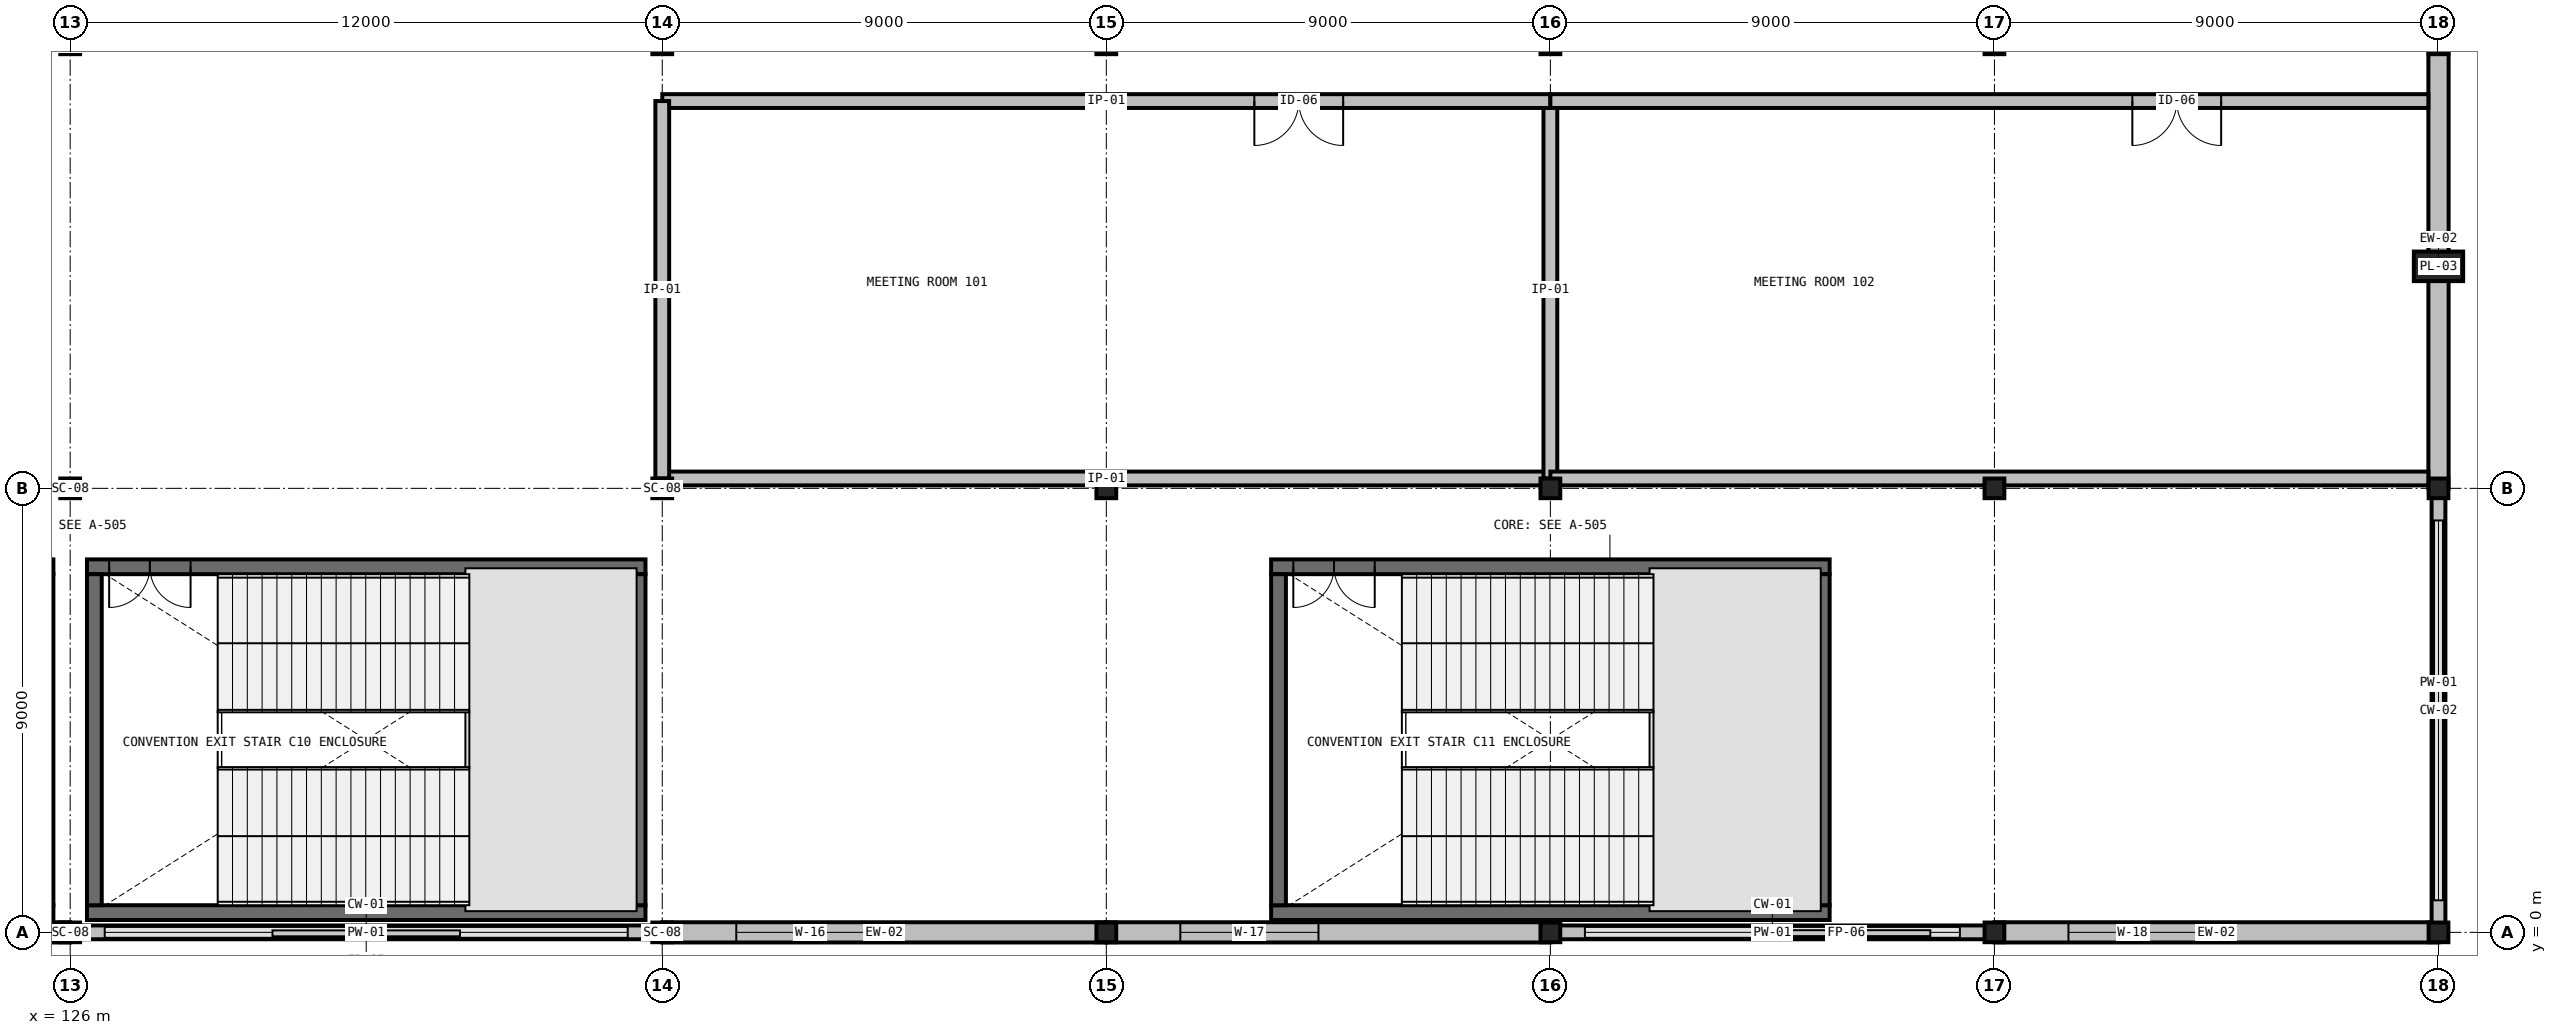
"""IFC4 building model, lengths in metres.
Left out: names, types, materials, properties, quantities, classifications, styles, units other than length and angle.
Written with IfcOpenShell. Run it as: python <this file> out.ifc"""

import sys

from ifc_helpers import new_model, si_unit, direction, frame, frame_2d, origin, origin_2d, place, context, subcontext, project, spatial, rectangle, i_section, extrude, element, fill, save


model = new_model("IFC4")
c1 = context("Model", 3, precision=1e-05, world=origin(), true_north=direction((0.0, 1.0)))
c2 = subcontext(c1, "Body", "Model", "MODEL_VIEW")
j1 = project(units=[si_unit("LENGTHUNIT", "METRE"), si_unit("PLANEANGLEUNIT", "RADIAN")], contexts=[c1])
p1 = place(None, origin())
s1 = spatial("IfcSite", under=j1, at=p1, CompositionType="ELEMENT")
p2 = place(p1, origin())
s2 = spatial("IfcBuilding", under=s1, at=p2, CompositionType="ELEMENT")
p3 = place(p2, frame((0.0, 0.0, 6.0)))
s3 = spatial("IfcBuildingStorey", under=s2, at=p3, CompositionType="ELEMENT", Elevation=6.0)
for number, where, z_axis, x_axis in (
    (1, (126.0, 0.0, 0.0), (0.0, 0.0, 1.0), (1.0, 0.0, 0.0)),
    (2, (126.0, 9.0, 0.0), (0.0, 0.0, 1.0), (1.0, 0.0, 0.0)),
    (3, (126.0, 18.0, 0.0), (0.0, 0.0, 1.0), (1.0, 0.0, 0.0)),
    (4, (138.0, 0.0, 0.0), (0.0, 0.0, 1.0), (1.0, 0.0, 0.0)),
    (5, (138.0, 9.0, 0.0), (0.0, 0.0, 1.0), (1.0, 0.0, 0.0)),
    (6, (138.0, 18.0, 0.0), (0.0, 0.0, 1.0), (1.0, 0.0, 0.0)),
    (7, (147.0, 0.0, 0.0), (0.0, 0.0, 1.0), (1.0, 0.0, 0.0)),
    (8, (147.0, 9.0, 0.0), (0.0, 0.0, 1.0), (1.0, 0.0, 0.0)),
    (9, (147.0, 18.0, 0.0), (0.0, 0.0, 1.0), (1.0, 0.0, 0.0)),
    (10, (156.0, 0.0, 0.0), (0.0, 0.0, 1.0), (1.0, 0.0, 0.0)),
    (11, (156.0, 9.0, 0.0), (0.0, 0.0, 1.0), (1.0, 0.0, 0.0)),
    (12, (156.0, 18.0, 0.0), (0.0, 0.0, 1.0), (1.0, 0.0, 0.0)),
    (13, (165.0, 0.0, 0.0), (0.0, 0.0, 1.0), (1.0, 0.0, 0.0)),
    (14, (165.0, 9.0, 0.0), (0.0, 0.0, 1.0), (1.0, 0.0, 0.0)),
    (15, (165.0, 18.0, 0.0), (0.0, 0.0, 1.0), (1.0, 0.0, 0.0)),
    (16, (174.0, 0.0, 0.0), (0.0, 0.0, 1.0), (1.0, 0.0, 0.0)),
    (17, (174.0, 9.0, 0.0), (0.0, 0.0, 1.0), (1.0, 0.0, 0.0)),
    (18, (174.0, 18.0, 0.0), (0.0, 0.0, 1.0), (1.0, 0.0, 0.0)),
):
    element("IfcColumn", number, at=place(p3, frame(where, z_axis=z_axis, x_axis=x_axis)), inside=s3, PredefinedType="COLUMN", context=c2, shape_type="SweptSolid", body=[
        extrude(i_section(OverallWidth=0.401, OverallDepth=0.399, WebThickness=0.025, FlangeThickness=0.04, FilletRadius=0.031, at=origin_2d()), origin(), (0.0, 0.0, 1.0), 6.0),
    ])
p4 = place(p3, frame((174.0, 13.5, 0.0), z_axis=(0.0, 0.0, 1.0), x_axis=(0.0, 1.0, 0.0)))
e19 = element("IfcColumn", 19, at=p4, inside=s3, PredefinedType="PILASTER", context=c2, shape_type="SweptSolid", body=[
    extrude(rectangle(XDim=0.6, YDim=1.0, at=origin_2d()), origin(), (0.0, 0.0, 1.0), 6.0),
])
p5 = place(p3, frame((125.66, 0.4, 0.0), z_axis=(0.0, 0.0, 1.0), x_axis=(-1.0, 0.0, 0.0)))
e20 = element("IfcWall", 20, at=p5, inside=s3, PredefinedType="SHEAR", context=c2, shape_type="SweptSolid", body=[
    extrude(rectangle(XDim=11.32, YDim=0.3, at=frame_2d((5.66, 0.0))), origin(), (0.0, 0.0, 1.0), 6.0),
])
p6 = place(p3, frame((125.66, 7.41, 0.0), z_axis=(0.0, 0.0, 1.0), x_axis=(-1.0, 0.0, 0.0)))
e21 = element("IfcWall", 21, at=p6, inside=s3, PredefinedType="SHEAR", context=c2, shape_type="SweptSolid", body=[
    extrude(rectangle(XDim=11.32, YDim=0.3, at=frame_2d((5.66, 0.0))), origin(), (0.0, 0.0, 1.0), 6.0),
])
p7 = place(p6, frame((9.22, 0.0, 0.0)))
e22 = element("IfcOpeningElement", 22, at=p7, cuts=e21, PredefinedType="OPENING", context=c2, shape_type="SweptSolid", body=[
    extrude(rectangle(XDim=1.65, YDim=2.25, at=frame_2d((0.825, 1.125))), frame((0.0, 0.165, 0.0), z_axis=(0.0, -1.0, 0.0), x_axis=(1.0, 0.0, 0.0)), (0.0, 0.0, 1.0), 0.33),
])
p8 = place(p3, frame((125.51, 0.55, 0.0), z_axis=(0.0, 0.0, 1.0), x_axis=(0.0, 1.0, 0.0)))
e23 = element("IfcWall", 23, at=p8, inside=s3, PredefinedType="SHEAR", context=c2, shape_type="SweptSolid", body=[
    extrude(rectangle(XDim=6.71, YDim=0.3, at=frame_2d((3.355, 0.0))), origin(), (0.0, 0.0, 1.0), 6.0),
])
p9 = place(p3, frame((137.66, 0.4, 0.0), z_axis=(0.0, 0.0, 1.0), x_axis=(-1.0, 0.0, 0.0)))
e24 = element("IfcWall", 24, at=p9, inside=s3, PredefinedType="SHEAR", context=c2, shape_type="SweptSolid", body=[
    extrude(rectangle(XDim=11.32, YDim=0.3, at=frame_2d((5.66, 0.0))), origin(), (0.0, 0.0, 1.0), 6.0),
])
p10 = place(p3, frame((137.66, 7.41, 0.0), z_axis=(0.0, 0.0, 1.0), x_axis=(-1.0, 0.0, 0.0)))
e25 = element("IfcWall", 25, at=p10, inside=s3, PredefinedType="SHEAR", context=c2, shape_type="SweptSolid", body=[
    extrude(rectangle(XDim=11.32, YDim=0.3, at=frame_2d((5.66, 0.0))), origin(), (0.0, 0.0, 1.0), 6.0),
])
p11 = place(p10, frame((9.22, 0.0, 0.0)))
e26 = element("IfcOpeningElement", 26, at=p11, cuts=e25, PredefinedType="OPENING", context=c2, shape_type="SweptSolid", body=[
    extrude(rectangle(XDim=1.65, YDim=2.25, at=frame_2d((0.825, 1.125))), frame((0.0, 0.165, 0.0), z_axis=(0.0, -1.0, 0.0), x_axis=(1.0, 0.0, 0.0)), (0.0, 0.0, 1.0), 0.33),
])
for number, where, z_axis, x_axis in (
    (27, (126.49, 7.26, 0.0), (0.0, 0.0, 1.0), (0.0, -1.0, 0.0)),
    (28, (137.51, 0.55, 0.0), (0.0, 0.0, 1.0), (0.0, 1.0, 0.0)),
):
    element("IfcWall", number, at=place(p3, frame(where, z_axis=z_axis, x_axis=x_axis)), inside=s3, PredefinedType="SHEAR", context=c2, shape_type="SweptSolid", body=[
        extrude(rectangle(XDim=6.71, YDim=0.3, at=frame_2d((3.355, 0.0))), origin(), (0.0, 0.0, 1.0), 6.0),
    ])
p12 = place(p3, frame((161.66, 0.4, 0.0), z_axis=(0.0, 0.0, 1.0), x_axis=(-1.0, 0.0, 0.0)))
e29 = element("IfcWall", 29, at=p12, inside=s3, PredefinedType="SHEAR", context=c2, shape_type="SweptSolid", body=[
    extrude(rectangle(XDim=11.32, YDim=0.3, at=frame_2d((5.66, 0.0))), origin(), (0.0, 0.0, 1.0), 6.0),
])
p13 = place(p3, frame((161.66, 7.41, 0.0), z_axis=(0.0, 0.0, 1.0), x_axis=(-1.0, 0.0, 0.0)))
e30 = element("IfcWall", 30, at=p13, inside=s3, PredefinedType="SHEAR", context=c2, shape_type="SweptSolid", body=[
    extrude(rectangle(XDim=11.32, YDim=0.3, at=frame_2d((5.66, 0.0))), origin(), (0.0, 0.0, 1.0), 6.0),
])
p14 = place(p13, frame((9.22, 0.0, 0.0)))
e31 = element("IfcOpeningElement", 31, at=p14, cuts=e30, PredefinedType="OPENING", context=c2, shape_type="SweptSolid", body=[
    extrude(rectangle(XDim=1.65, YDim=2.25, at=frame_2d((0.825, 1.125))), frame((0.0, 0.165, 0.0), z_axis=(0.0, -1.0, 0.0), x_axis=(1.0, 0.0, 0.0)), (0.0, 0.0, 1.0), 0.33),
])
for number, where, z_axis, x_axis in (
    (32, (150.49, 7.26, 0.0), (0.0, 0.0, 1.0), (0.0, -1.0, 0.0)),
    (33, (161.51, 0.55, 0.0), (0.0, 0.0, 1.0), (0.0, 1.0, 0.0)),
):
    element("IfcWall", number, at=place(p3, frame(where, z_axis=z_axis, x_axis=x_axis)), inside=s3, PredefinedType="SHEAR", context=c2, shape_type="SweptSolid", body=[
        extrude(rectangle(XDim=6.71, YDim=0.3, at=frame_2d((3.355, 0.0))), origin(), (0.0, 0.0, 1.0), 6.0),
    ])
p15 = place(p3, frame((114.0, 0.0, 0.0), z_axis=(0.0, 0.0, 1.0), x_axis=(1.0, 0.0, 0.0)))
e34 = element("IfcWall", 34, at=p15, inside=s3, PredefinedType="STANDARD", context=c2, shape_type="SweptSolid", body=[
    extrude(rectangle(XDim=12.0, YDim=0.41, at=frame_2d((6.0, 0.0))), origin(), (0.0, 0.0, 1.0), 4.676),
])
p16 = place(p15, frame((1.5, 0.0, 0.85)))
e35 = element("IfcOpeningElement", 35, at=p16, cuts=e34, PredefinedType="OPENING", context=c2, shape_type="SweptSolid", body=[
    extrude(rectangle(XDim=2.2, YDim=1.95, at=frame_2d((1.1, 0.975))), frame((0.0, 0.22, 0.0), z_axis=(0.0, -1.0, 0.0), x_axis=(1.0, 0.0, 0.0)), (0.0, 0.0, 1.0), 0.44),
])
p17 = place(p3, frame((126.0, 0.0, 0.0), z_axis=(0.0, 0.0, 1.0), x_axis=(1.0, 0.0, 0.0)))
e36 = element("IfcWall", 36, at=p17, inside=s3, PredefinedType="PARAPET", context=c2, shape_type="SweptSolid", body=[
    extrude(rectangle(XDim=12.0, YDim=0.28, at=frame_2d((6.0, 0.0))), origin(), (0.0, 0.0, 1.0), 0.2),
])
p18 = place(p3, frame((138.0, 0.0, 0.0), z_axis=(0.0, 0.0, 1.0), x_axis=(1.0, 0.0, 0.0)))
e37 = element("IfcWall", 37, at=p18, inside=s3, PredefinedType="STANDARD", context=c2, shape_type="SweptSolid", body=[
    extrude(rectangle(XDim=9.0, YDim=0.41, at=frame_2d((4.5, 0.0))), origin(), (0.0, 0.0, 1.0), 4.676),
])
p19 = place(p18, frame((1.5, 0.0, 0.85)))
e38 = element("IfcOpeningElement", 38, at=p19, cuts=e37, PredefinedType="OPENING", context=c2, shape_type="SweptSolid", body=[
    extrude(rectangle(XDim=3.0, YDim=2.3, at=frame_2d((1.5, 1.15))), frame((0.0, 0.22, 0.0), z_axis=(0.0, -1.0, 0.0), x_axis=(1.0, 0.0, 0.0)), (0.0, 0.0, 1.0), 0.44),
])
p20 = place(p3, frame((147.0, 0.0, 0.0), z_axis=(0.0, 0.0, 1.0), x_axis=(1.0, 0.0, 0.0)))
e39 = element("IfcWall", 39, at=p20, inside=s3, PredefinedType="STANDARD", context=c2, shape_type="SweptSolid", body=[
    extrude(rectangle(XDim=9.0, YDim=0.41, at=frame_2d((4.5, 0.0))), origin(), (0.0, 0.0, 1.0), 4.676),
])
p21 = place(p20, frame((1.5, 0.0, 0.85)))
e40 = element("IfcOpeningElement", 40, at=p21, cuts=e39, PredefinedType="OPENING", context=c2, shape_type="SweptSolid", body=[
    extrude(rectangle(XDim=2.8, YDim=2.4, at=frame_2d((1.4, 1.2))), frame((0.0, 0.22, 0.0), z_axis=(0.0, -1.0, 0.0), x_axis=(1.0, 0.0, 0.0)), (0.0, 0.0, 1.0), 0.44),
])
p22 = place(p3, frame((156.0, 0.0, 0.0), z_axis=(0.0, 0.0, 1.0), x_axis=(1.0, 0.0, 0.0)))
e41 = element("IfcWall", 41, at=p22, inside=s3, PredefinedType="PARAPET", context=c2, shape_type="SweptSolid", body=[
    extrude(rectangle(XDim=9.0, YDim=0.28, at=frame_2d((4.5, 0.0))), origin(), (0.0, 0.0, 1.0), 0.2),
])
p23 = place(p3, frame((165.0, 0.0, 0.0), z_axis=(0.0, 0.0, 1.0), x_axis=(1.0, 0.0, 0.0)))
e42 = element("IfcWall", 42, at=p23, inside=s3, PredefinedType="STANDARD", context=c2, shape_type="SweptSolid", body=[
    extrude(rectangle(XDim=9.0, YDim=0.41, at=frame_2d((4.5, 0.0))), origin(), (0.0, 0.0, 1.0), 4.676),
])
p24 = place(p23, frame((1.5, 0.0, 0.85)))
e43 = element("IfcOpeningElement", 43, at=p24, cuts=e42, PredefinedType="OPENING", context=c2, shape_type="SweptSolid", body=[
    extrude(rectangle(XDim=2.6, YDim=2.25, at=frame_2d((1.3, 1.125))), frame((0.0, 0.22, 0.0), z_axis=(0.0, -1.0, 0.0), x_axis=(1.0, 0.0, 0.0)), (0.0, 0.0, 1.0), 0.44),
])
p25 = place(p3, frame((174.0, 0.0, 0.0), z_axis=(0.0, 0.0, 1.0), x_axis=(0.0, 1.0, 0.0)))
e44 = element("IfcWall", 44, at=p25, inside=s3, PredefinedType="PARAPET", context=c2, shape_type="SweptSolid", body=[
    extrude(rectangle(XDim=9.0, YDim=0.28, at=frame_2d((4.5, 0.0))), origin(), (0.0, 0.0, 1.0), 0.2),
])
p26 = place(p3, frame((174.0, 9.0, 0.0), z_axis=(0.0, 0.0, 1.0), x_axis=(0.0, 1.0, 0.0)))
e45 = element("IfcWall", 45, at=p26, inside=s3, PredefinedType="STANDARD", context=c2, shape_type="SweptSolid", body=[
    extrude(rectangle(XDim=9.0, YDim=0.41, at=frame_2d((4.5, 0.0))), origin(), (0.0, 0.0, 1.0), 5.269),
])
p27 = place(p3, frame((138.0, 9.2, 0.0), z_axis=(0.0, 0.0, 1.0), x_axis=(1.0, 0.0, 0.0)))
e46 = element("IfcWall", 46, at=p27, inside=s3, PredefinedType="PARTITIONING", context=c2, shape_type="SweptSolid", body=[
    extrude(rectangle(XDim=18.0, YDim=0.28, at=frame_2d((9.0, 0.0))), origin(), (0.0, 0.0, 1.0), 5.68),
])
p28 = place(p3, frame((156.0, 9.2, 0.0), z_axis=(0.0, 0.0, 1.0), x_axis=(0.0, 1.0, 0.0)))
e47 = element("IfcWall", 47, at=p28, inside=s3, PredefinedType="PARTITIONING", context=c2, shape_type="SweptSolid", body=[
    extrude(rectangle(XDim=7.65, YDim=0.28, at=frame_2d((3.825, 0.0))), origin(), (0.0, 0.0, 1.0), 4.913),
])
p29 = place(p3, frame((156.0, 16.85, 0.0), z_axis=(0.0, 0.0, 1.0), x_axis=(-1.0, 0.0, 0.0)))
e48 = element("IfcWall", 48, at=p29, inside=s3, PredefinedType="PARTITIONING", context=c2, shape_type="SweptSolid", body=[
    extrude(rectangle(XDim=18.0, YDim=0.28, at=frame_2d((9.0, 0.0))), origin(), (0.0, 0.0, 1.0), 5.68),
])
p30 = place(p29, frame((4.2, 0.0, 0.0)))
e49 = element("IfcOpeningElement", 49, at=p30, cuts=e48, PredefinedType="OPENING", context=c2, shape_type="SweptSolid", body=[
    extrude(rectangle(XDim=1.8, YDim=2.3, at=frame_2d((0.9, 1.15))), frame((0.0, 0.155, 0.0), z_axis=(0.0, -1.0, 0.0), x_axis=(1.0, 0.0, 0.0)), (0.0, 0.0, 1.0), 0.31),
])
p31 = place(p3, frame((138.0, 16.85, 0.0), z_axis=(0.0, 0.0, 1.0), x_axis=(0.0, -1.0, 0.0)))
e50 = element("IfcWall", 50, at=p31, inside=s3, PredefinedType="PARTITIONING", context=c2, shape_type="SweptSolid", body=[
    extrude(rectangle(XDim=7.65, YDim=0.28, at=frame_2d((3.825, 0.0))), origin(), (0.0, 0.0, 1.0), 4.913),
])
p32 = place(p3, frame((156.0, 9.2, 0.0), z_axis=(0.0, 0.0, 1.0), x_axis=(1.0, 0.0, 0.0)))
e51 = element("IfcWall", 51, at=p32, inside=s3, PredefinedType="PARTITIONING", context=c2, shape_type="SweptSolid", body=[
    extrude(rectangle(XDim=17.795, YDim=0.28, at=frame_2d((8.897, 0.0))), origin(), (0.0, 0.0, 1.0), 5.68),
])
p33 = place(p3, frame((173.795, 16.85, 0.0), z_axis=(0.0, 0.0, 1.0), x_axis=(-1.0, 0.0, 0.0)))
e52 = element("IfcWall", 52, at=p33, inside=s3, PredefinedType="PARTITIONING", context=c2, shape_type="SweptSolid", body=[
    extrude(rectangle(XDim=17.795, YDim=0.28, at=frame_2d((8.897, 0.0))), origin(), (0.0, 0.0, 1.0), 5.68),
])
p34 = place(p33, frame((4.2, 0.0, 0.0)))
e53 = element("IfcOpeningElement", 53, at=p34, cuts=e52, PredefinedType="OPENING", context=c2, shape_type="SweptSolid", body=[
    extrude(rectangle(XDim=1.8, YDim=2.3, at=frame_2d((0.9, 1.15))), frame((0.0, 0.155, 0.0), z_axis=(0.0, -1.0, 0.0), x_axis=(1.0, 0.0, 0.0)), (0.0, 0.0, 1.0), 0.31),
])
p35 = place(p11, origin())
e54 = element("IfcDoor", 54, at=p35, inside=s3, OperationType="DOUBLE_DOOR_SINGLE_SWING", PredefinedType="DOOR", context=c2, shape_type="SweptSolid", body=[
    extrude(rectangle(XDim=1.65, YDim=2.25, at=frame_2d((0.825, 1.125))), frame((0.0, 0.025, 0.0), z_axis=(0.0, -1.0, 0.0), x_axis=(1.0, 0.0, 0.0)), (0.0, 0.0, 1.0), 0.05),
])
fill(e26, e54)
p36 = place(p14, origin())
e55 = element("IfcDoor", 55, at=p36, inside=s3, OperationType="DOUBLE_DOOR_SINGLE_SWING", PredefinedType="DOOR", context=c2, shape_type="SweptSolid", body=[
    extrude(rectangle(XDim=1.65, YDim=2.25, at=frame_2d((0.825, 1.125))), frame((0.0, 0.025, 0.0), z_axis=(0.0, -1.0, 0.0), x_axis=(1.0, 0.0, 0.0)), (0.0, 0.0, 1.0), 0.05),
])
fill(e31, e55)
p37 = place(p19, origin())
e56 = element("IfcWindow", 56, at=p37, inside=s3, PartitioningType="TRIPLE_PANEL_VERTICAL", PredefinedType="WINDOW", context=c2, shape_type="SweptSolid", body=[
    extrude(rectangle(XDim=3.0, YDim=2.3, at=frame_2d((1.5, 1.15))), frame((0.0, 0.03, 0.0), z_axis=(0.0, -1.0, 0.0), x_axis=(1.0, 0.0, 0.0)), (0.0, 0.0, 1.0), 0.06),
])
fill(e38, e56)
p38 = place(p21, origin())
e57 = element("IfcWindow", 57, at=p38, inside=s3, PartitioningType="DOUBLE_PANEL_VERTICAL", PredefinedType="WINDOW", context=c2, shape_type="SweptSolid", body=[
    extrude(rectangle(XDim=2.8, YDim=2.4, at=frame_2d((1.4, 1.2))), frame((0.0, 0.03, 0.0), z_axis=(0.0, -1.0, 0.0), x_axis=(1.0, 0.0, 0.0)), (0.0, 0.0, 1.0), 0.06),
])
fill(e40, e57)
p39 = place(p24, origin())
e58 = element("IfcWindow", 58, at=p39, inside=s3, PartitioningType="DOUBLE_PANEL_VERTICAL", PredefinedType="WINDOW", context=c2, shape_type="SweptSolid", body=[
    extrude(rectangle(XDim=2.6, YDim=2.25, at=frame_2d((1.3, 1.125))), frame((0.0, 0.03, 0.0), z_axis=(0.0, -1.0, 0.0), x_axis=(1.0, 0.0, 0.0)), (0.0, 0.0, 1.0), 0.06),
])
fill(e43, e58)
p40 = place(p30, origin())
e59 = element("IfcDoor", 59, at=p40, inside=s3, OperationType="DOUBLE_DOOR_SINGLE_SWING", PredefinedType="DOOR", context=c2, shape_type="SweptSolid", body=[
    extrude(rectangle(XDim=1.8, YDim=2.3, at=frame_2d((0.9, 1.15))), frame((0.0, 0.025, 0.0), z_axis=(0.0, -1.0, 0.0), x_axis=(1.0, 0.0, 0.0)), (0.0, 0.0, 1.0), 0.05),
])
fill(e49, e59)
p41 = place(p34, origin())
e60 = element("IfcDoor", 60, at=p41, inside=s3, OperationType="DOUBLE_DOOR_SINGLE_SWING", PredefinedType="DOOR", context=c2, shape_type="SweptSolid", body=[
    extrude(rectangle(XDim=1.8, YDim=2.3, at=frame_2d((0.9, 1.15))), frame((0.0, 0.025, 0.0), z_axis=(0.0, -1.0, 0.0), x_axis=(1.0, 0.0, 0.0)), (0.0, 0.0, 1.0), 0.05),
])
fill(e53, e60)
save(model, sys.argv[1])
